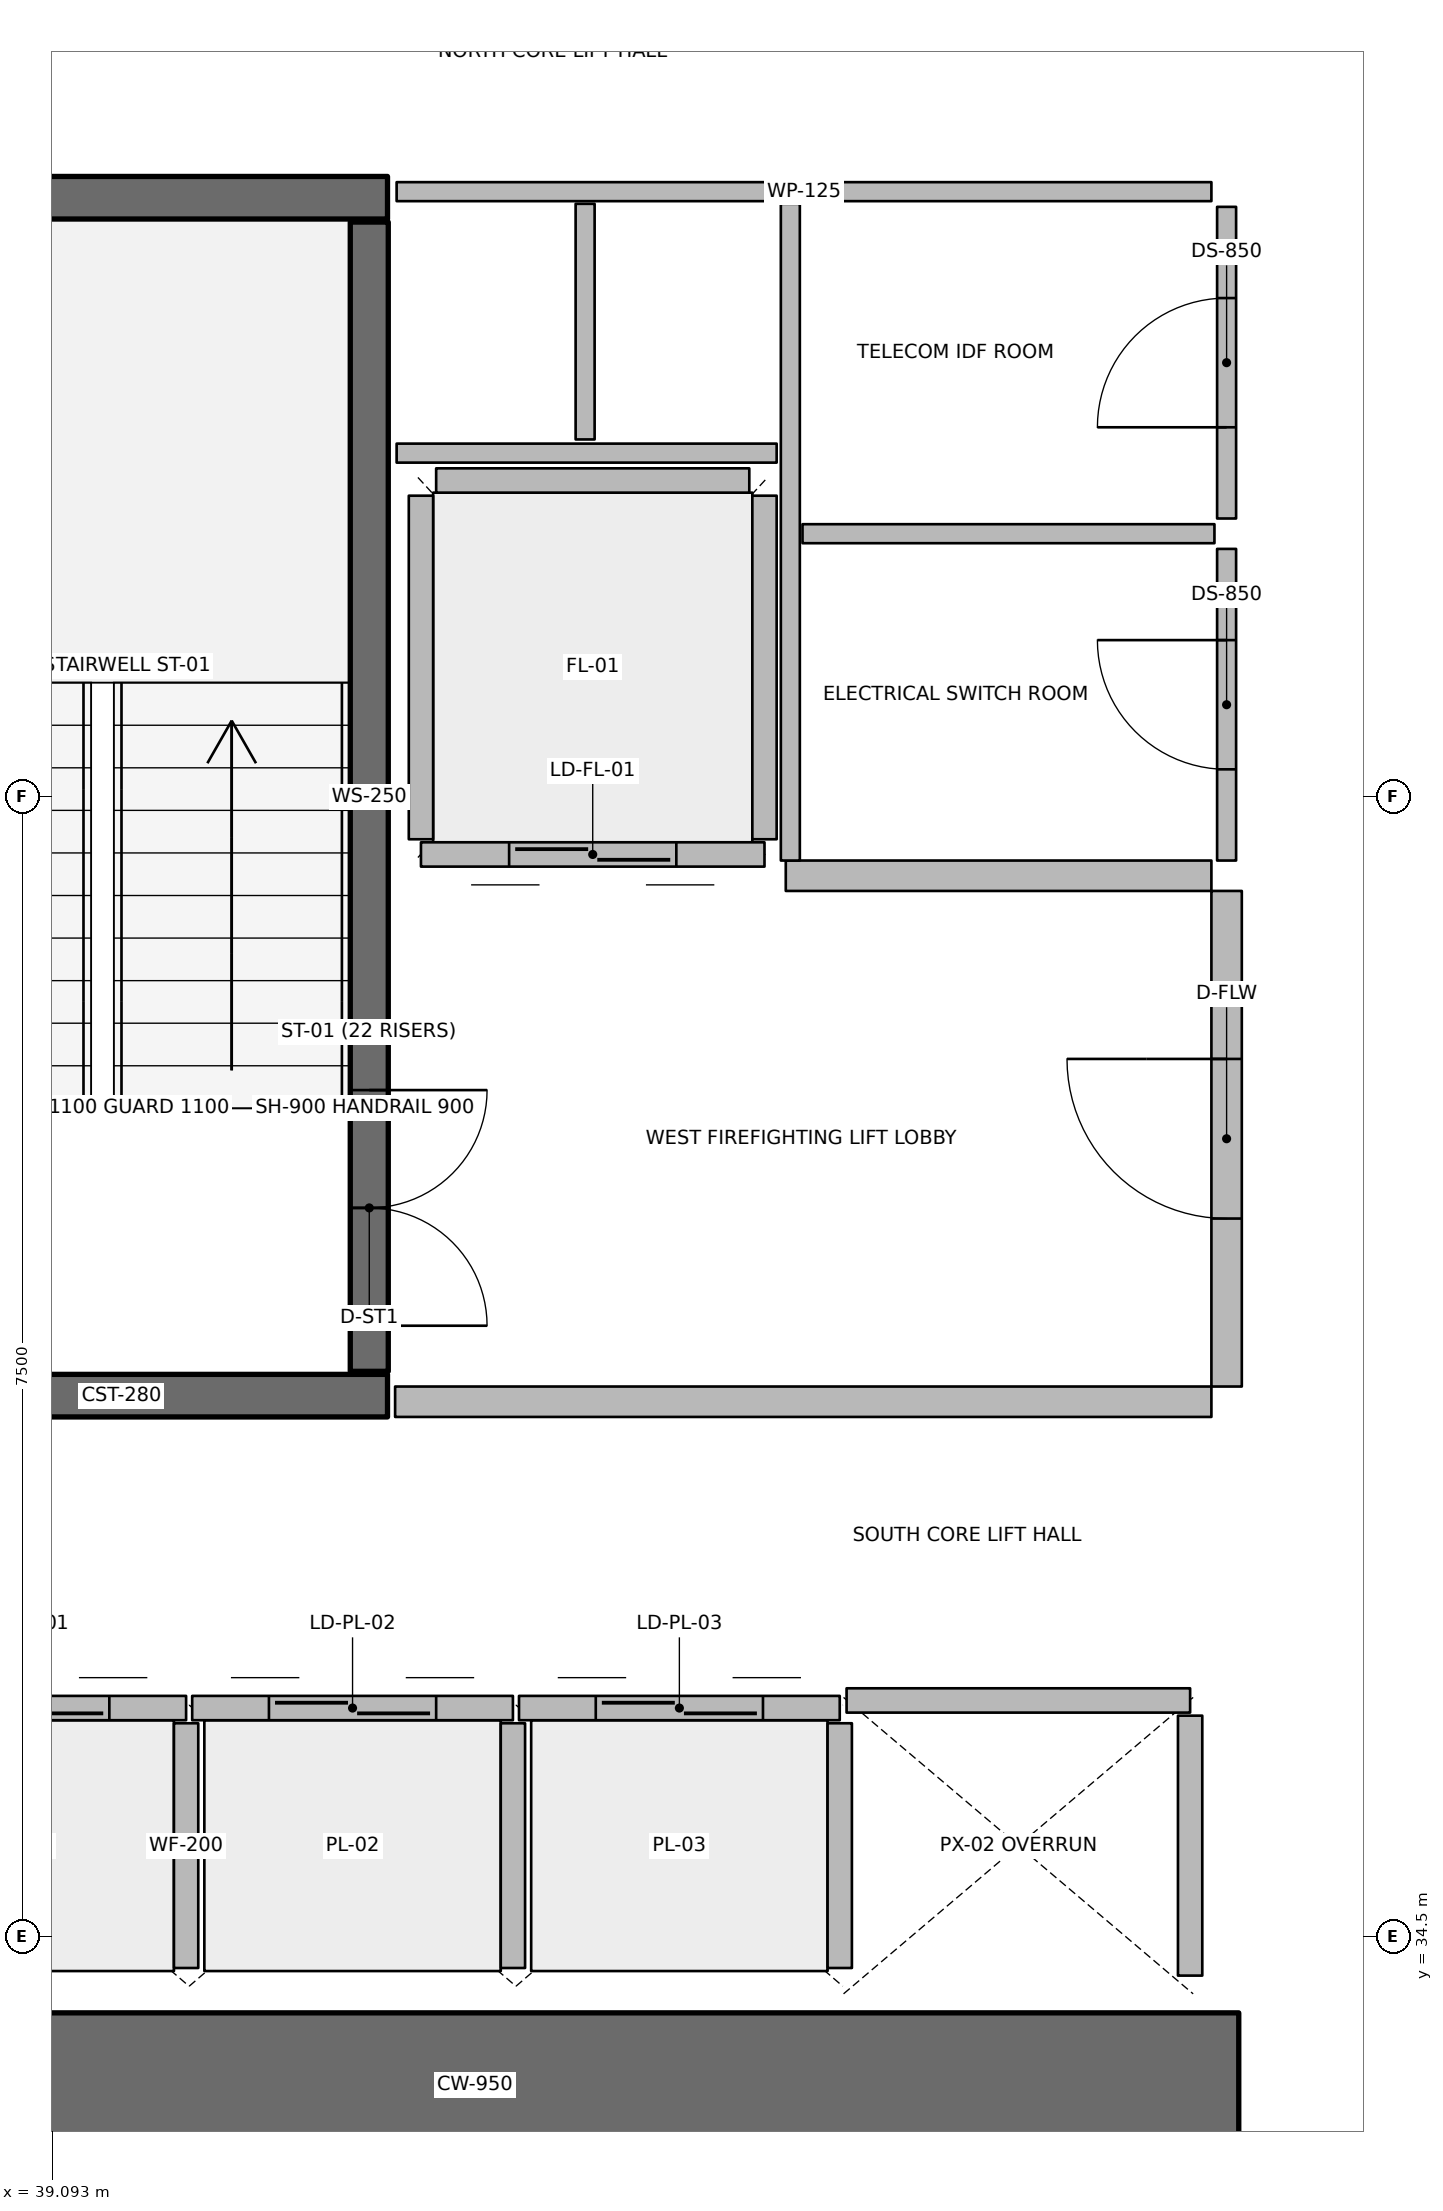
"""IFC4 building model, lengths in metres.
Left out: names, types, materials, properties, quantities, classifications, styles, units other than length and angle.
Written with IfcOpenShell. Run it as: python <this file> out.ifc"""

import sys

from ifc_helpers import new_model, si_unit, direction, frame, frame_2d, origin, origin_2d, place, context, subcontext, project, spatial, rectangle, hollow_rectangle, extrude, element, fill, save


model = new_model("IFC4")
c1 = context("Model", 3, precision=1e-05, world=origin(), true_north=direction((0.0, 1.0)))
c2 = subcontext(c1, "Body", "Model", "MODEL_VIEW")
j1 = project(units=[si_unit("LENGTHUNIT", "METRE"), si_unit("PLANEANGLEUNIT", "RADIAN")], contexts=[c1])
p1 = place(None, origin())
s1 = spatial("IfcSite", under=j1, at=p1, CompositionType="ELEMENT")
p2 = place(p1, origin())
s2 = spatial("IfcBuilding", under=s1, at=p2, CompositionType="ELEMENT")
p3 = place(p2, frame((0.0, 0.0, 26.4)))
s3 = spatial("IfcBuildingStorey", under=s2, at=p3, CompositionType="ELEMENT", Elevation=26.4)
p4 = place(p3, frame((36.85, 33.525, 0.0), z_axis=(0.0, 0.0, 1.0), x_axis=(1.0, 0.0, 0.0)))
e1 = element("IfcWall", 1, at=p4, inside=s3, PredefinedType="SHEAR", context=c2, shape_type="SweptSolid", body=[
    extrude(rectangle(XDim=10.05, YDim=0.95, at=frame_2d((5.025, 0.0))), origin(), (0.0, 0.0, 1.0), 3.75),
])
for number, where, z_axis, x_axis in (
    (2, (37.8, 38.06, 0.0), (0.0, 0.0, 1.0), (1.0, 0.0, 0.0)),
    (3, (37.8, 45.94, 0.0), (0.0, 0.0, 1.0), (1.0, 0.0, 0.0)),
):
    element("IfcWall", number, at=place(p3, frame(where, z_axis=z_axis, x_axis=x_axis)), inside=s3, PredefinedType="SHEAR", context=c2, shape_type="SweptSolid", body=[
        extrude(rectangle(XDim=3.5, YDim=0.28, at=frame_2d((1.75, 0.0))), origin(), (0.0, 0.0, 1.0), 3.75),
    ])
p5 = place(p3, frame((41.18, 42.75, 0.0), z_axis=(0.0, 0.0, 1.0), x_axis=(1.0, 0.0, 0.0)))
e4 = element("IfcColumn", 4, at=p5, inside=s3, PredefinedType="COLUMN", context=c2, shape_type="SweptSolid", body=[
    extrude(hollow_rectangle(XDim=0.2, YDim=0.2, WallThickness=0.01, InnerFilletRadius=0.01, OuterFilletRadius=0.02, at=origin_2d()), origin(), (0.0, 0.0, 1.0), 1.67),
])
p6 = place(p3, frame((41.18, 38.22, 0.0), z_axis=(0.0, 0.0, 1.0), x_axis=(0.0, 1.0, 0.0)))
e5 = element("IfcWall", 5, at=p6, inside=s3, PredefinedType="SOLIDWALL", context=c2, shape_type="SweptSolid", body=[
    extrude(rectangle(XDim=7.56, YDim=0.25, at=frame_2d((3.78, 0.0))), origin(), (0.0, 0.0, 1.0), 3.5),
])
p7 = place(p6, frame((0.3, 0.0, 0.0)))
e6 = element("IfcOpeningElement", 6, at=p7, cuts=e5, PredefinedType="OPENING", context=c2, shape_type="SweptSolid", body=[
    extrude(rectangle(XDim=1.55, YDim=2.15, at=frame_2d((0.775, 1.075))), frame((0.0, 0.135, 0.0), z_axis=(0.0, -1.0, 0.0), x_axis=(1.0, 0.0, 0.0)), (0.0, 0.0, 1.0), 0.27),
])
p8 = place(p3, frame((37.865, 36.005, 0.0), z_axis=(0.0, 0.0, 1.0), x_axis=(1.0, 0.0, 0.0)))
e7 = element("IfcWall", 7, at=p8, inside=s3, PredefinedType="PARTITIONING", context=c2, shape_type="SweptSolid", body=[
    extrude(rectangle(XDim=2.11, YDim=0.16, at=frame_2d((1.055, 0.0))), origin(), (0.0, 0.0, 1.0), 3.5),
])
p9 = place(p8, frame((0.505, 0.0, 0.0)))
e8 = element("IfcOpeningElement", 8, at=p9, cuts=e7, PredefinedType="OPENING", context=c2, shape_type="SweptSolid", body=[
    extrude(rectangle(XDim=1.1, YDim=2.1, at=frame_2d((0.55, 1.05))), frame((0.0, 0.09, 0.0), z_axis=(0.0, -1.0, 0.0), x_axis=(1.0, 0.0, 0.0)), (0.0, 0.0, 1.0), 0.18),
])
p10 = place(p3, frame((39.975, 34.295, 0.0), z_axis=(0.0, 0.0, 1.0), x_axis=(0.0, 1.0, 0.0)))
e9 = element("IfcWall", 9, at=p10, inside=s3, PredefinedType="PARTITIONING", context=c2, shape_type="SweptSolid", body=[
    extrude(rectangle(XDim=1.61, YDim=0.16, at=frame_2d((0.805, 0.0))), origin(), (0.0, 0.0, 1.0), 3.5),
])
p11 = place(p3, frame((40.015, 36.005, 0.0), z_axis=(0.0, 0.0, 1.0), x_axis=(1.0, 0.0, 0.0)))
e10 = element("IfcWall", 10, at=p11, inside=s3, PredefinedType="PARTITIONING", context=c2, shape_type="SweptSolid", body=[
    extrude(rectangle(XDim=2.11, YDim=0.16, at=frame_2d((1.055, 0.0))), origin(), (0.0, 0.0, 1.0), 3.5),
])
p12 = place(p11, frame((0.505, 0.0, 0.0)))
e11 = element("IfcOpeningElement", 11, at=p12, cuts=e10, PredefinedType="OPENING", context=c2, shape_type="SweptSolid", body=[
    extrude(rectangle(XDim=1.1, YDim=2.1, at=frame_2d((0.55, 1.05))), frame((0.0, 0.09, 0.0), z_axis=(0.0, -1.0, 0.0), x_axis=(1.0, 0.0, 0.0)), (0.0, 0.0, 1.0), 0.18),
])
p13 = place(p3, frame((42.125, 34.295, 0.0), z_axis=(0.0, 0.0, 1.0), x_axis=(0.0, 1.0, 0.0)))
e12 = element("IfcWall", 12, at=p13, inside=s3, PredefinedType="PARTITIONING", context=c2, shape_type="SweptSolid", body=[
    extrude(rectangle(XDim=1.61, YDim=0.16, at=frame_2d((0.805, 0.0))), origin(), (0.0, 0.0, 1.0), 3.5),
])
p14 = place(p3, frame((42.165, 36.005, 0.0), z_axis=(0.0, 0.0, 1.0), x_axis=(1.0, 0.0, 0.0)))
e13 = element("IfcWall", 13, at=p14, inside=s3, PredefinedType="PARTITIONING", context=c2, shape_type="SweptSolid", body=[
    extrude(rectangle(XDim=2.11, YDim=0.16, at=frame_2d((1.055, 0.0))), origin(), (0.0, 0.0, 1.0), 3.5),
])
p15 = place(p14, frame((0.505, 0.0, 0.0)))
e14 = element("IfcOpeningElement", 14, at=p15, cuts=e13, PredefinedType="OPENING", context=c2, shape_type="SweptSolid", body=[
    extrude(rectangle(XDim=1.1, YDim=2.1, at=frame_2d((0.55, 1.05))), frame((0.0, 0.09, 0.0), z_axis=(0.0, -1.0, 0.0), x_axis=(1.0, 0.0, 0.0)), (0.0, 0.0, 1.0), 0.18),
])
p16 = place(p3, frame((44.275, 34.295, 0.0), z_axis=(0.0, 0.0, 1.0), x_axis=(0.0, 1.0, 0.0)))
e15 = element("IfcWall", 15, at=p16, inside=s3, PredefinedType="PARTITIONING", context=c2, shape_type="SweptSolid", body=[
    extrude(rectangle(XDim=1.61, YDim=0.16, at=frame_2d((0.805, 0.0))), origin(), (0.0, 0.0, 1.0), 3.5),
])
p17 = place(p3, frame((44.32, 36.055, 0.0), z_axis=(0.0, 0.0, 1.0), x_axis=(1.0, 0.0, 0.0)))
e16 = element("IfcWall", 16, at=p17, inside=s3, PredefinedType="PARTITIONING", context=c2, shape_type="SweptSolid", body=[
    extrude(rectangle(XDim=2.26, YDim=0.16, at=frame_2d((1.13, 0.0))), origin(), (0.0, 0.0, 1.0), 3.5),
])
p18 = place(p3, frame((46.58, 34.245, 0.0), z_axis=(0.0, 0.0, 1.0), x_axis=(0.0, 1.0, 0.0)))
e17 = element("IfcWall", 17, at=p18, inside=s3, PredefinedType="PARTITIONING", context=c2, shape_type="SweptSolid", body=[
    extrude(rectangle(XDim=1.71, YDim=0.16, at=frame_2d((0.855, 0.0))), origin(), (0.0, 0.0, 1.0), 3.5),
])
p19 = place(p3, frame((43.78, 41.62, 0.0), z_axis=(0.0, 0.0, 1.0), x_axis=(-1.0, 0.0, 0.0)))
e18 = element("IfcWall", 18, at=p19, inside=s3, PredefinedType="PARTITIONING", context=c2, shape_type="SweptSolid", body=[
    extrude(rectangle(XDim=2.26, YDim=0.16, at=frame_2d((1.13, 0.0))), origin(), (0.0, 0.0, 1.0), 3.5),
])
p20 = place(p19, frame((0.58, 0.0, 0.0)))
e19 = element("IfcOpeningElement", 19, at=p20, cuts=e18, PredefinedType="OPENING", context=c2, shape_type="SweptSolid", body=[
    extrude(rectangle(XDim=1.1, YDim=2.1, at=frame_2d((0.55, 1.05))), frame((0.0, 0.09, 0.0), z_axis=(0.0, -1.0, 0.0), x_axis=(1.0, 0.0, 0.0)), (0.0, 0.0, 1.0), 0.18),
])
for number, where, z_axis, x_axis in (
    (20, (43.78, 41.72, 0.0), (0.0, 0.0, 1.0), (0.0, 1.0, 0.0)),
    (21, (41.52, 41.72, 0.0), (0.0, 0.0, 1.0), (0.0, 1.0, 0.0)),
):
    element("IfcWall", number, at=place(p3, frame(where, z_axis=z_axis, x_axis=x_axis)), inside=s3, PredefinedType="PARTITIONING", context=c2, shape_type="SweptSolid", body=[
        extrude(rectangle(XDim=2.26, YDim=0.16, at=frame_2d((1.13, 0.0))), origin(), (0.0, 0.0, 1.0), 3.5),
    ])
p21 = place(p3, frame((41.62, 44.08, 0.0), z_axis=(0.0, 0.0, 1.0), x_axis=(1.0, 0.0, 0.0)))
e22 = element("IfcWall", 22, at=p21, inside=s3, PredefinedType="PARTITIONING", context=c2, shape_type="SweptSolid", body=[
    extrude(rectangle(XDim=2.06, YDim=0.16, at=frame_2d((1.03, 0.0))), origin(), (0.0, 0.0, 1.0), 3.5),
])
p22 = place(p3, frame((41.35, 38.02, 0.0), z_axis=(0.0, 0.0, 1.0), x_axis=(1.0, 0.0, 0.0)))
e23 = element("IfcWall", 23, at=p22, inside=s3, PredefinedType="PARTITIONING", context=c2, shape_type="SweptSolid", body=[
    extrude(rectangle(XDim=5.37, YDim=0.2, at=frame_2d((2.685, 0.0))), origin(), (0.0, 0.0, 1.0), 3.5),
])
p23 = place(p3, frame((43.92, 41.48, 0.0), z_axis=(0.0, 0.0, 1.0), x_axis=(1.0, 0.0, 0.0)))
e24 = element("IfcWall", 24, at=p23, inside=s3, PredefinedType="PARTITIONING", context=c2, shape_type="SweptSolid", body=[
    extrude(rectangle(XDim=2.8, YDim=0.2, at=frame_2d((1.4, 0.0))), origin(), (0.0, 0.0, 1.0), 3.5),
])
p24 = place(p3, frame((46.82, 38.12, 0.0), z_axis=(0.0, 0.0, 1.0), x_axis=(0.0, 1.0, 0.0)))
e25 = element("IfcWall", 25, at=p24, inside=s3, PredefinedType="PARTITIONING", context=c2, shape_type="SweptSolid", body=[
    extrude(rectangle(XDim=3.26, YDim=0.2, at=frame_2d((1.63, 0.0))), origin(), (0.0, 0.0, 1.0), 3.5),
])
p25 = place(p24, frame((1.105, 0.0, 0.0)))
e26 = element("IfcOpeningElement", 26, at=p25, cuts=e25, PredefinedType="OPENING", context=c2, shape_type="SweptSolid", body=[
    extrude(rectangle(XDim=1.05, YDim=2.1, at=frame_2d((0.525, 1.05))), frame((0.0, 0.11, 0.0), z_axis=(0.0, -1.0, 0.0), x_axis=(1.0, 0.0, 0.0)), (0.0, 0.0, 1.0), 0.22),
])
p26 = place(p3, frame((41.36, 45.98, 0.0), z_axis=(0.0, 0.0, 1.0), x_axis=(1.0, 0.0, 0.0)))
e27 = element("IfcWall", 27, at=p26, inside=s3, PredefinedType="PARTITIONING", context=c2, shape_type="SweptSolid", body=[
    extrude(rectangle(XDim=5.36, YDim=0.125, at=frame_2d((2.68, 0.0))), origin(), (0.0, 0.0, 1.0), 2.94),
])
p27 = place(p3, frame((41.36, 44.26, 0.0), z_axis=(0.0, 0.0, 1.0), x_axis=(1.0, 0.0, 0.0)))
e28 = element("IfcWall", 28, at=p27, inside=s3, PredefinedType="PARTITIONING", context=c2, shape_type="SweptSolid", body=[
    extrude(rectangle(XDim=2.5, YDim=0.125, at=frame_2d((1.25, 0.0))), origin(), (0.0, 0.0, 1.0), 2.94),
])
p28 = place(p3, frame((42.6, 44.35, 0.0), z_axis=(0.0, 0.0, 1.0), x_axis=(0.0, 1.0, 0.0)))
e29 = element("IfcWall", 29, at=p28, inside=s3, PredefinedType="PARTITIONING", context=c2, shape_type="SweptSolid", body=[
    extrude(rectangle(XDim=1.55, YDim=0.125, at=frame_2d((0.775, 0.0))), origin(), (0.0, 0.0, 1.0), 2.94),
])
p29 = place(p3, frame((43.95, 41.58, 0.0), z_axis=(0.0, 0.0, 1.0), x_axis=(0.0, 1.0, 0.0)))
e30 = element("IfcWall", 30, at=p29, inside=s3, PredefinedType="PARTITIONING", context=c2, shape_type="SweptSolid", body=[
    extrude(rectangle(XDim=4.32, YDim=0.125, at=frame_2d((2.16, 0.0))), origin(), (0.0, 0.0, 1.0), 2.94),
])
p30 = place(p3, frame((44.03, 43.73, 0.0), z_axis=(0.0, 0.0, 1.0), x_axis=(1.0, 0.0, 0.0)))
e31 = element("IfcWall", 31, at=p30, inside=s3, PredefinedType="PARTITIONING", context=c2, shape_type="SweptSolid", body=[
    extrude(rectangle(XDim=2.71, YDim=0.125, at=frame_2d((1.355, 0.0))), origin(), (0.0, 0.0, 1.0), 2.94),
])
p31 = place(p3, frame((46.82, 41.58, 0.0), z_axis=(0.0, 0.0, 1.0), x_axis=(0.0, 1.0, 0.0)))
e32 = element("IfcWall", 32, at=p31, inside=s3, PredefinedType="PARTITIONING", context=c2, shape_type="SweptSolid", body=[
    extrude(rectangle(XDim=2.05, YDim=0.125, at=frame_2d((1.025, 0.0))), origin(), (0.0, 0.0, 1.0), 2.94),
])
p32 = place(p31, frame((0.6, 0.0, 0.0)))
e33 = element("IfcOpeningElement", 33, at=p32, cuts=e32, PredefinedType="OPENING", context=c2, shape_type="SweptSolid", body=[
    extrude(rectangle(XDim=0.85, YDim=2.06, at=frame_2d((0.425, 1.03))), frame((0.0, 0.073, 0.0), z_axis=(0.0, -1.0, 0.0), x_axis=(1.0, 0.0, 0.0)), (0.0, 0.0, 1.0), 0.145),
])
p33 = place(p3, frame((46.82, 43.83, 0.0), z_axis=(0.0, 0.0, 1.0), x_axis=(0.0, 1.0, 0.0)))
e34 = element("IfcWall", 34, at=p33, inside=s3, PredefinedType="PARTITIONING", context=c2, shape_type="SweptSolid", body=[
    extrude(rectangle(XDim=2.05, YDim=0.125, at=frame_2d((1.025, 0.0))), origin(), (0.0, 0.0, 1.0), 2.94),
])
p34 = place(p33, frame((0.6, 0.0, 0.0)))
e35 = element("IfcOpeningElement", 35, at=p34, cuts=e34, PredefinedType="OPENING", context=c2, shape_type="SweptSolid", body=[
    extrude(rectangle(XDim=0.85, YDim=2.06, at=frame_2d((0.425, 1.03))), frame((0.0, 0.073, 0.0), z_axis=(0.0, -1.0, 0.0), x_axis=(1.0, 0.0, 0.0)), (0.0, 0.0, 1.0), 0.145),
])
p35 = place(p7, origin())
e36 = element("IfcDoor", 36, at=p35, inside=s3, OperationType="DOUBLE_DOOR_SINGLE_SWING", PredefinedType="DOOR", context=c2, shape_type="SweptSolid", body=[
    extrude(rectangle(XDim=1.55, YDim=2.15, at=frame_2d((0.775, 1.075))), frame((0.0, 0.025, 0.0), z_axis=(0.0, -1.0, 0.0), x_axis=(1.0, 0.0, 0.0)), (0.0, 0.0, 1.0), 0.05),
])
fill(e6, e36)
p36 = place(p9, origin())
e37 = element("IfcDoor", 37, at=p36, inside=s3, OperationType="DOUBLE_DOOR_SLIDING", PredefinedType="DOOR", context=c2, shape_type="SweptSolid", body=[
    extrude(rectangle(XDim=1.1, YDim=2.1, at=frame_2d((0.55, 1.05))), frame((0.0, 0.025, 0.0), z_axis=(0.0, -1.0, 0.0), x_axis=(1.0, 0.0, 0.0)), (0.0, 0.0, 1.0), 0.05),
])
fill(e8, e37)
p37 = place(p12, origin())
e38 = element("IfcDoor", 38, at=p37, inside=s3, OperationType="DOUBLE_DOOR_SLIDING", PredefinedType="DOOR", context=c2, shape_type="SweptSolid", body=[
    extrude(rectangle(XDim=1.1, YDim=2.1, at=frame_2d((0.55, 1.05))), frame((0.0, 0.025, 0.0), z_axis=(0.0, -1.0, 0.0), x_axis=(1.0, 0.0, 0.0)), (0.0, 0.0, 1.0), 0.05),
])
fill(e11, e38)
p38 = place(p15, origin())
e39 = element("IfcDoor", 39, at=p38, inside=s3, OperationType="DOUBLE_DOOR_SLIDING", PredefinedType="DOOR", context=c2, shape_type="SweptSolid", body=[
    extrude(rectangle(XDim=1.1, YDim=2.1, at=frame_2d((0.55, 1.05))), frame((0.0, 0.025, 0.0), z_axis=(0.0, -1.0, 0.0), x_axis=(1.0, 0.0, 0.0)), (0.0, 0.0, 1.0), 0.05),
])
fill(e14, e39)
p39 = place(p20, origin())
e40 = element("IfcDoor", 40, at=p39, inside=s3, OperationType="DOUBLE_DOOR_SLIDING", PredefinedType="DOOR", context=c2, shape_type="SweptSolid", body=[
    extrude(rectangle(XDim=1.1, YDim=2.1, at=frame_2d((0.55, 1.05))), frame((0.0, 0.025, 0.0), z_axis=(0.0, -1.0, 0.0), x_axis=(1.0, 0.0, 0.0)), (0.0, 0.0, 1.0), 0.05),
])
fill(e19, e40)
p40 = place(p25, origin())
e41 = element("IfcDoor", 41, at=p40, inside=s3, OperationType="SINGLE_SWING_RIGHT", PredefinedType="DOOR", context=c2, shape_type="SweptSolid", body=[
    extrude(rectangle(XDim=1.05, YDim=2.1, at=frame_2d((0.525, 1.05))), frame((0.0, 0.025, 0.0), z_axis=(0.0, -1.0, 0.0), x_axis=(1.0, 0.0, 0.0)), (0.0, 0.0, 1.0), 0.05),
])
fill(e26, e41)
p41 = place(p32, origin())
e42 = element("IfcDoor", 42, at=p41, inside=s3, OperationType="SINGLE_SWING_RIGHT", PredefinedType="DOOR", context=c2, shape_type="SweptSolid", body=[
    extrude(rectangle(XDim=0.85, YDim=2.06, at=frame_2d((0.425, 1.03))), frame((0.0, 0.025, 0.0), z_axis=(0.0, -1.0, 0.0), x_axis=(1.0, 0.0, 0.0)), (0.0, 0.0, 1.0), 0.05),
])
fill(e33, e42)
p42 = place(p34, origin())
e43 = element("IfcDoor", 43, at=p42, inside=s3, OperationType="SINGLE_SWING_LEFT", PredefinedType="DOOR", context=c2, shape_type="SweptSolid", body=[
    extrude(rectangle(XDim=0.85, YDim=2.06, at=frame_2d((0.425, 1.03))), frame((0.0, 0.025, 0.0), z_axis=(0.0, -1.0, 0.0), x_axis=(1.0, 0.0, 0.0)), (0.0, 0.0, 1.0), 0.05),
])
fill(e35, e43)
save(model, sys.argv[1])
